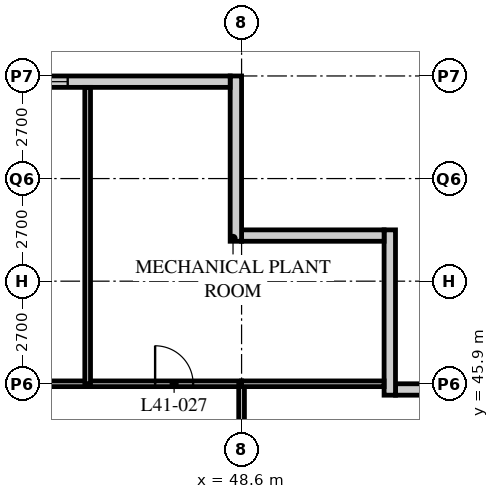
"""IFC4 building model, lengths in metres.
Left out: names, types, materials, properties, quantities, classifications, styles, units other than length and angle.
Written with IfcOpenShell. Run it as: python <this file> out.ifc"""

import sys

from ifc_helpers import new_model, si_unit, direction, frame, frame_2d, origin, place, context, subcontext, project, spatial, rectangle, extrude, element, fill, save


model = new_model("IFC4")
c1 = context("Model", 3, precision=1e-05, world=origin(), true_north=direction((0.0, 1.0)))
c2 = subcontext(c1, "Body", "Model", "MODEL_VIEW")
j1 = project(units=[si_unit("LENGTHUNIT", "METRE"), si_unit("PLANEANGLEUNIT", "RADIAN")], contexts=[c1])
p1 = place(None, origin())
s1 = spatial("IfcSite", under=j1, at=p1, CompositionType="ELEMENT")
p2 = place(p1, origin())
s2 = spatial("IfcBuilding", under=s1, at=p2, CompositionType="ELEMENT")
p3 = place(p2, frame((0.0, 0.0, 157.8)))
s3 = spatial("IfcBuildingStorey", under=s2, at=p3, CompositionType="ELEMENT", Elevation=157.8)
p4 = place(p3, frame((56.4, 45.75, 0.0), z_axis=(0.0, 0.0, 1.0), x_axis=(-1.0, 0.0, 0.0)))
e1 = element("IfcWall", 1, at=p4, inside=s3, PredefinedType="SOLIDWALL", context=c2, shape_type="SweptSolid", body=[
    extrude(rectangle(XDim=3.75, YDim=0.3, at=frame_2d((1.875, 0.0))), origin(), (0.0, 0.0, 1.0), 5.95),
])
p5 = place(p3, frame((52.5, 45.6, 0.0), z_axis=(0.0, 0.0, 1.0), x_axis=(0.0, 1.0, 0.0)))
e2 = element("IfcWall", 2, at=p5, inside=s3, PredefinedType="SOLIDWALL", context=c2, shape_type="SweptSolid", body=[
    extrude(rectangle(XDim=4.35, YDim=0.3, at=frame_2d((2.175, 0.0))), origin(), (0.0, 0.0, 1.0), 6.95),
])
p6 = place(p3, frame((52.35, 49.8, 0.0), z_axis=(0.0, 0.0, 1.0), x_axis=(-1.0, 0.0, 0.0)))
e3 = element("IfcWall", 3, at=p6, inside=s3, PredefinedType="SOLIDWALL", context=c2, shape_type="SweptSolid", body=[
    extrude(rectangle(XDim=3.75, YDim=0.3, at=frame_2d((1.875, 0.0))), origin(), (0.0, 0.0, 1.0), 6.95),
])
p7 = place(p3, frame((48.45, 49.65, 0.0), z_axis=(0.0, 0.0, 1.0), x_axis=(0.0, 1.0, 0.0)))
e4 = element("IfcWall", 4, at=p7, inside=s3, PredefinedType="SOLIDWALL", context=c2, shape_type="SweptSolid", body=[
    extrude(rectangle(XDim=4.35, YDim=0.3, at=frame_2d((2.175, 0.0))), origin(), (0.0, 0.0, 1.0), 5.95),
])
p8 = place(p3, frame((48.3, 53.85, 0.0), z_axis=(0.0, 0.0, 1.0), x_axis=(-1.0, 0.0, 0.0)))
e5 = element("IfcWall", 5, at=p8, inside=s3, PredefinedType="SOLIDWALL", context=c2, shape_type="SweptSolid", body=[
    extrude(rectangle(XDim=40.2, YDim=0.3, at=frame_2d((20.1, 0.0))), origin(), (0.0, 0.0, 1.0), 5.95),
])
p9 = place(p8, frame((4.275, 0.0, 1.0)))
e6 = element("IfcOpeningElement", 6, at=p9, cuts=e5, PredefinedType="OPENING", context=c2, shape_type="SweptSolid", body=[
    extrude(rectangle(XDim=3.0, YDim=1.8, at=frame_2d((1.5, 0.9))), frame((0.0, 0.16, 0.0), z_axis=(0.0, -1.0, 0.0), x_axis=(1.0, 0.0, 0.0)), (0.0, 0.0, 1.0), 0.32),
])
p10 = place(p8, frame((12.375, 0.0, 1.0)))
e7 = element("IfcOpeningElement", 7, at=p10, cuts=e5, PredefinedType="OPENING", context=c2, shape_type="SweptSolid", body=[
    extrude(rectangle(XDim=3.0, YDim=1.8, at=frame_2d((1.5, 0.9))), frame((0.0, 0.16, 0.0), z_axis=(0.0, -1.0, 0.0), x_axis=(1.0, 0.0, 0.0)), (0.0, 0.0, 1.0), 0.32),
])
p11 = place(p8, frame((24.525, 0.0, 1.0)))
e8 = element("IfcOpeningElement", 8, at=p11, cuts=e5, PredefinedType="OPENING", context=c2, shape_type="SweptSolid", body=[
    extrude(rectangle(XDim=3.0, YDim=1.8, at=frame_2d((1.5, 0.9))), frame((0.0, 0.16, 0.0), z_axis=(0.0, -1.0, 0.0), x_axis=(1.0, 0.0, 0.0)), (0.0, 0.0, 1.0), 0.32),
])
p12 = place(p8, frame((32.625, 0.0, 1.0)))
e9 = element("IfcOpeningElement", 9, at=p12, cuts=e5, PredefinedType="OPENING", context=c2, shape_type="SweptSolid", body=[
    extrude(rectangle(XDim=3.0, YDim=1.8, at=frame_2d((1.5, 0.9))), frame((0.0, 0.16, 0.0), z_axis=(0.0, -1.0, 0.0), x_axis=(1.0, 0.0, 0.0)), (0.0, 0.0, 1.0), 0.32),
])
p13 = place(p3, frame((8.1, 45.9, 0.0), z_axis=(0.0, 0.0, 1.0), x_axis=(1.0, 0.0, 0.0)))
e10 = element("IfcWall", 10, at=p13, inside=s3, PredefinedType="PARTITIONING", context=c2, shape_type="SweptSolid", body=[
    extrude(rectangle(XDim=40.5, YDim=0.15, at=frame_2d((20.25, 0.0))), origin(), (0.0, 0.0, 1.0), 5.95),
])
p14 = place(p13, frame((8.7, 0.0, 0.0)))
e11 = element("IfcOpeningElement", 11, at=p14, cuts=e10, PredefinedType="OPENING", context=c2, shape_type="SweptSolid", body=[
    extrude(rectangle(XDim=1.8, YDim=2.4, at=frame_2d((0.9, 1.2))), frame((0.0, 0.085, 0.0), z_axis=(0.0, -1.0, 0.0), x_axis=(1.0, 0.0, 0.0)), (0.0, 0.0, 1.0), 0.17),
])
p15 = place(p13, frame((19.35, 0.0, 0.0)))
e12 = element("IfcOpeningElement", 12, at=p15, cuts=e10, PredefinedType="OPENING", context=c2, shape_type="SweptSolid", body=[
    extrude(rectangle(XDim=1.8, YDim=2.4, at=frame_2d((0.9, 1.2))), frame((0.0, 0.085, 0.0), z_axis=(0.0, -1.0, 0.0), x_axis=(1.0, 0.0, 0.0)), (0.0, 0.0, 1.0), 0.17),
])
p16 = place(p13, frame((30.0, 0.0, 0.0)))
e13 = element("IfcOpeningElement", 13, at=p16, cuts=e10, PredefinedType="OPENING", context=c2, shape_type="SweptSolid", body=[
    extrude(rectangle(XDim=1.8, YDim=2.4, at=frame_2d((0.9, 1.2))), frame((0.0, 0.085, 0.0), z_axis=(0.0, -1.0, 0.0), x_axis=(1.0, 0.0, 0.0)), (0.0, 0.0, 1.0), 0.17),
])
p17 = place(p13, frame((38.225, 0.0, 0.0)))
e14 = element("IfcOpeningElement", 14, at=p17, cuts=e10, PredefinedType="OPENING", context=c2, shape_type="SweptSolid", body=[
    extrude(rectangle(XDim=1.0, YDim=2.1, at=frame_2d((0.5, 1.05))), frame((0.0, 0.085, 0.0), z_axis=(0.0, -1.0, 0.0), x_axis=(1.0, 0.0, 0.0)), (0.0, 0.0, 1.0), 0.17),
])
p18 = place(p13, frame((1.275, 0.0, 0.0)))
e15 = element("IfcOpeningElement", 15, at=p18, cuts=e10, PredefinedType="OPENING", context=c2, shape_type="SweptSolid", body=[
    extrude(rectangle(XDim=1.0, YDim=2.1, at=frame_2d((0.5, 1.05))), frame((0.0, 0.085, 0.0), z_axis=(0.0, -1.0, 0.0), x_axis=(1.0, 0.0, 0.0)), (0.0, 0.0, 1.0), 0.17),
])
p19 = place(p3, frame((48.6, 13.5, 0.0), z_axis=(0.0, 0.0, 1.0), x_axis=(0.0, 1.0, 0.0)))
e16 = element("IfcWall", 16, at=p19, inside=s3, PredefinedType="PARTITIONING", context=c2, shape_type="SweptSolid", body=[
    extrude(rectangle(XDim=32.4, YDim=0.15, at=frame_2d((16.2, 0.0))), origin(), (0.0, 0.0, 1.0), 5.95),
])
p20 = place(p19, frame((10.95, 0.0, 0.0)))
e17 = element("IfcOpeningElement", 17, at=p20, cuts=e16, PredefinedType="OPENING", context=c2, shape_type="SweptSolid", body=[
    extrude(rectangle(XDim=1.8, YDim=2.4, at=frame_2d((0.9, 1.2))), frame((0.0, 0.085, 0.0), z_axis=(0.0, -1.0, 0.0), x_axis=(1.0, 0.0, 0.0)), (0.0, 0.0, 1.0), 0.17),
])
p21 = place(p19, frame((27.15, 0.0, 0.0)))
e18 = element("IfcOpeningElement", 18, at=p21, cuts=e16, PredefinedType="OPENING", context=c2, shape_type="SweptSolid", body=[
    extrude(rectangle(XDim=1.8, YDim=2.4, at=frame_2d((0.9, 1.2))), frame((0.0, 0.085, 0.0), z_axis=(0.0, -1.0, 0.0), x_axis=(1.0, 0.0, 0.0)), (0.0, 0.0, 1.0), 0.17),
])
p22 = place(p3, frame((48.6, 45.9, 0.0), z_axis=(0.0, 0.0, 1.0), x_axis=(1.0, 0.0, 0.0)))
e19 = element("IfcWall", 19, at=p22, inside=s3, PredefinedType="PARTITIONING", context=c2, shape_type="SweptSolid", body=[
    extrude(rectangle(XDim=3.75, YDim=0.15, at=frame_2d((1.875, 0.0))), origin(), (0.0, 0.0, 1.0), 5.95),
])
p23 = place(p3, frame((44.55, 45.9, 0.0), z_axis=(0.0, 0.0, 1.0), x_axis=(0.0, 1.0, 0.0)))
e20 = element("IfcWall", 20, at=p23, inside=s3, PredefinedType="PARTITIONING", context=c2, shape_type="SweptSolid", body=[
    extrude(rectangle(XDim=7.8, YDim=0.15, at=frame_2d((3.9, 0.0))), origin(), (0.0, 0.0, 1.0), 6.95),
])
p24 = place(p9, origin())
e21 = element("IfcWindow", 21, at=p24, inside=s3, PartitioningType="SINGLE_PANEL", PredefinedType="USERDEFINED", context=c2, shape_type="SweptSolid", body=[
    extrude(rectangle(XDim=3.0, YDim=1.8, at=frame_2d((1.5, 0.9))), frame((0.0, 0.075, 0.0), z_axis=(0.0, -1.0, 0.0), x_axis=(1.0, 0.0, 0.0)), (0.0, 0.0, 1.0), 0.15),
])
fill(e6, e21)
p25 = place(p17, origin())
e22 = element("IfcDoor", 22, at=p25, inside=s3, OperationType="SINGLE_SWING_LEFT", PredefinedType="DOOR", context=c2, shape_type="SweptSolid", body=[
    extrude(rectangle(XDim=1.0, YDim=2.1, at=frame_2d((0.5, 1.05))), frame((0.0, 0.025, 0.0), z_axis=(0.0, -1.0, 0.0), x_axis=(1.0, 0.0, 0.0)), (0.0, 0.0, 1.0), 0.05),
])
fill(e14, e22)
save(model, sys.argv[1])
